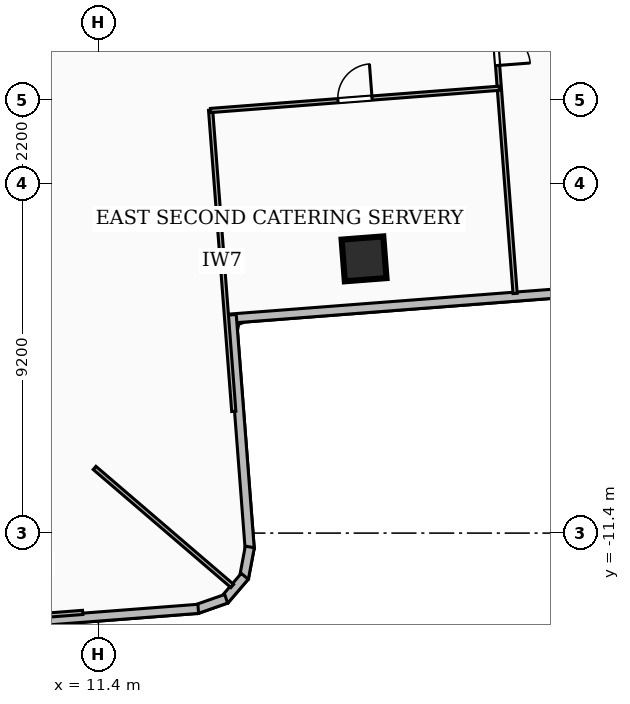
"""IFC4 building model, lengths in metres.
Left out: names, types, materials, properties, quantities, classifications, styles, units other than length and angle.
Written with IfcOpenShell. Run it as: python <this file> out.ifc"""

import sys

from ifc_helpers import new_model, si_unit, direction, frame, frame_2d, origin, origin_2d, place, context, subcontext, project, spatial, rectangle, extrude, element, fill, save


model = new_model("IFC4")
c1 = context("Model", 3, precision=1e-05, world=origin(), true_north=direction((0.0, 1.0)))
c2 = subcontext(c1, "Body", "Model", "MODEL_VIEW")
j1 = project(units=[si_unit("LENGTHUNIT", "METRE"), si_unit("PLANEANGLEUNIT", "RADIAN")], contexts=[c1])
p1 = place(None, origin())
s1 = spatial("IfcSite", under=j1, at=p1, CompositionType="ELEMENT")
p2 = place(p1, origin())
s2 = spatial("IfcBuilding", under=s1, at=p2, CompositionType="ELEMENT")
p3 = place(p2, frame((0.0, 0.0, 60.48)))
s3 = spatial("IfcBuildingStorey", under=s2, at=p3, CompositionType="ELEMENT", Elevation=60.48)
p4 = place(p3, frame((18.391, -4.184, 0.0), z_axis=(0.0, 0.0, 1.0), x_axis=(0.997052752227, 0.076719028127, 0.0)))
e1 = element("IfcColumn", 1, at=p4, inside=s3, PredefinedType="COLUMN", context=c2, shape_type="SweptSolid", body=[
    extrude(rectangle(XDim=1.1, YDim=1.1, at=origin_2d()), origin(), (0.0, 0.0, 1.0), 3.6),
])
p5 = place(p3, frame((31.645, -4.465, 0.0), z_axis=(0.0, 0.0, 1.0), x_axis=(-0.997051676532, -0.076733006752, 0.0)))
e2 = element("IfcWall", 2, at=p5, inside=s3, PredefinedType="SOLIDWALL", context=c2, shape_type="SweptSolid", body=[
    extrude(rectangle(XDim=16.876, YDim=0.24, at=frame_2d((8.438, 0.0))), origin(), (0.0, 0.0, 1.0), 3.32),
])
p6 = place(p5, frame((1.1, 0.0, 0.85)))
e3 = element("IfcOpeningElement", 3, at=p6, cuts=e2, PredefinedType="OPENING", context=c2, shape_type="SweptSolid", body=[
    extrude(rectangle(XDim=2.7, YDim=1.85, at=frame_2d((1.35, 0.925))), frame((0.0, 0.13, 0.0), z_axis=(0.0, -1.0, 0.0), x_axis=(1.0, 0.0, 0.0)), (0.0, 0.0, 1.0), 0.26),
])
p7 = place(p3, frame((14.908, -5.657, 0.0), z_axis=(0.0, 0.0, 1.0), x_axis=(0.076778128006, -0.997048202977, 0.0)))
e4 = element("IfcWall", 4, at=p7, inside=s3, PredefinedType="SOLIDWALL", context=c2, shape_type="SweptSolid", body=[
    extrude(rectangle(XDim=6.175, YDim=0.24, at=frame_2d((3.088, 0.0))), origin(), (0.0, 0.0, 1.0), 3.32),
])
p8 = place(p3, frame((15.385, -11.764, 0.0), z_axis=(0.0, 0.0, 1.0), x_axis=(-0.185263427582, -0.982688894005, 0.0)))
e5 = element("IfcWall", 5, at=p8, inside=s3, PredefinedType="SOLIDWALL", context=c2, shape_type="SweptSolid", body=[
    extrude(rectangle(XDim=0.832, YDim=0.24, at=frame_2d((0.416, 0.0))), origin(), (0.0, 0.0, 1.0), 3.32),
])
p9 = place(p3, frame((15.252, -12.537, 0.0), z_axis=(0.0, 0.0, 1.0), x_axis=(-0.650371098657, -0.759616636226, 0.0)))
e6 = element("IfcWall", 6, at=p9, inside=s3, PredefinedType="SOLIDWALL", context=c2, shape_type="SweptSolid", body=[
    extrude(rectangle(XDim=0.813, YDim=0.24, at=frame_2d((0.407, 0.0))), origin(), (0.0, 0.0, 1.0), 3.32),
])
p10 = place(p3, frame((14.763, -13.128, 0.0), z_axis=(0.0, 0.0, 1.0), x_axis=(-0.943569376564, -0.331174926, 0.0)))
e7 = element("IfcWall", 7, at=p10, inside=s3, PredefinedType="SOLIDWALL", context=c2, shape_type="SweptSolid", body=[
    extrude(rectangle(XDim=0.831, YDim=0.24, at=frame_2d((0.416, 0.0))), origin(), (0.0, 0.0, 1.0), 3.32),
])
p11 = place(p3, frame((14.028, -13.393, 0.0), z_axis=(0.0, 0.0, 1.0), x_axis=(-0.997050032451, -0.076754366588, 0.0)))
e8 = element("IfcWall", 8, at=p11, inside=s3, PredefinedType="SOLIDWALL", context=c2, shape_type="SweptSolid", body=[
    extrude(rectangle(XDim=6.775, YDim=0.24, at=frame_2d((3.388, 0.0))), origin(), (0.0, 0.0, 1.0), 3.32),
])
p12 = place(p3, frame((11.3, -9.685, 0.0), z_axis=(0.0, 0.0, 1.0), x_axis=(0.759206042513, -0.650850355313, 0.0)))
e9 = element("IfcWall", 9, at=p12, inside=s3, PredefinedType="PARTITIONING", context=c2, shape_type="SweptSolid", body=[
    extrude(rectangle(XDim=4.772, YDim=0.11, at=frame_2d((2.386, 0.0))), origin(), (0.0, 0.0, 1.0), 3.32),
])
p13 = place(p3, frame((14.963, -8.197, 0.0), z_axis=(0.0, 0.0, 1.0), x_axis=(-0.076708240121, 0.99705358226, 0.0)))
e10 = element("IfcWall", 10, at=p13, inside=s3, PredefinedType="PARTITIONING", context=c2, shape_type="SweptSolid", body=[
    extrude(rectangle(XDim=7.95, YDim=0.11, at=frame_2d((3.975, 0.0))), origin(), (0.0, 0.0, 1.0), 2.401),
])
p14 = place(p3, frame((14.354, -0.28, 0.0), z_axis=(0.0, 0.0, 1.0), x_axis=(0.997048639669, 0.076772456877, 0.0)))
e11 = element("IfcWall", 11, at=p14, inside=s3, PredefinedType="PARTITIONING", context=c2, shape_type="SweptSolid", body=[
    extrude(rectangle(XDim=7.619, YDim=0.11, at=frame_2d((3.81, 0.0))), origin(), (0.0, 0.0, 1.0), 3.32),
])
p15 = place(p14, frame((3.36, 0.0, 0.0)))
e12 = element("IfcOpeningElement", 12, at=p15, cuts=e11, PredefinedType="OPENING", context=c2, shape_type="SweptSolid", body=[
    extrude(rectangle(XDim=0.9, YDim=2.06, at=frame_2d((0.45, 1.03))), frame((0.0, 0.065, 0.0), z_axis=(0.0, -1.0, 0.0), x_axis=(1.0, 0.0, 0.0)), (0.0, 0.0, 1.0), 0.13),
])
p16 = place(p3, frame((21.37, 7.858, 0.0), z_axis=(0.0, 0.0, 1.0), x_axis=(0.076662005745, -0.99705713822, 0.0)))
e13 = element("IfcWall", 13, at=p16, inside=s3, PredefinedType="PARTITIONING", context=c2, shape_type="SweptSolid", body=[
    extrude(rectangle(XDim=12.99, YDim=0.11, at=frame_2d((6.495, 0.0))), origin(), (0.0, 0.0, 1.0), 2.401),
])
p17 = place(p16, frame((6.115, 0.0, 0.0)))
e14 = element("IfcOpeningElement", 14, at=p17, cuts=e13, PredefinedType="OPENING", context=c2, shape_type="SweptSolid", body=[
    extrude(rectangle(XDim=0.86, YDim=2.04, at=frame_2d((0.43, 1.02))), frame((0.0, 0.065, 0.0), z_axis=(0.0, -1.0, 0.0), x_axis=(1.0, 0.0, 0.0)), (0.0, 0.0, 1.0), 0.13),
])
p18 = place(p16, frame((4.915, 0.0, 0.0)))
e15 = element("IfcOpeningElement", 15, at=p18, cuts=e13, PredefinedType="OPENING", context=c2, shape_type="SweptSolid", body=[
    extrude(rectangle(XDim=0.86, YDim=2.04, at=frame_2d((0.43, 1.02))), frame((0.0, 0.065, 0.0), z_axis=(0.0, -1.0, 0.0), x_axis=(1.0, 0.0, 0.0)), (0.0, 0.0, 1.0), 0.13),
])
p19 = place(p3, frame((2.462, -14.143, 0.0), z_axis=(0.0, 0.0, 1.0), x_axis=(0.997052469631, 0.076722700704, 0.0)))
e16 = element("IfcWall", 16, at=p19, inside=s3, PredefinedType="PARTITIONING", context=c2, shape_type="SweptSolid", body=[
    extrude(rectangle(XDim=8.55, YDim=0.11, at=frame_2d((4.275, 0.0))), origin(), (0.0, 0.0, 1.0), 2.401),
])
p20 = place(p15, origin())
e17 = element("IfcDoor", 17, at=p20, inside=s3, OperationType="SINGLE_SWING_RIGHT", PredefinedType="DOOR", context=c2, shape_type="SweptSolid", body=[
    extrude(rectangle(XDim=0.9, YDim=2.06, at=frame_2d((0.45, 1.03))), frame((0.0, 0.025, 0.0), z_axis=(0.0, -1.0, 0.0), x_axis=(1.0, 0.0, 0.0)), (0.0, 0.0, 1.0), 0.05),
])
fill(e12, e17)
p21 = place(p17, origin())
e18 = element("IfcDoor", 18, at=p21, inside=s3, OperationType="SINGLE_SWING_RIGHT", PredefinedType="DOOR", context=c2, shape_type="SweptSolid", body=[
    extrude(rectangle(XDim=0.86, YDim=2.04, at=frame_2d((0.43, 1.02))), frame((0.0, 0.025, 0.0), z_axis=(0.0, -1.0, 0.0), x_axis=(1.0, 0.0, 0.0)), (0.0, 0.0, 1.0), 0.05),
])
fill(e14, e18)
save(model, sys.argv[1])
